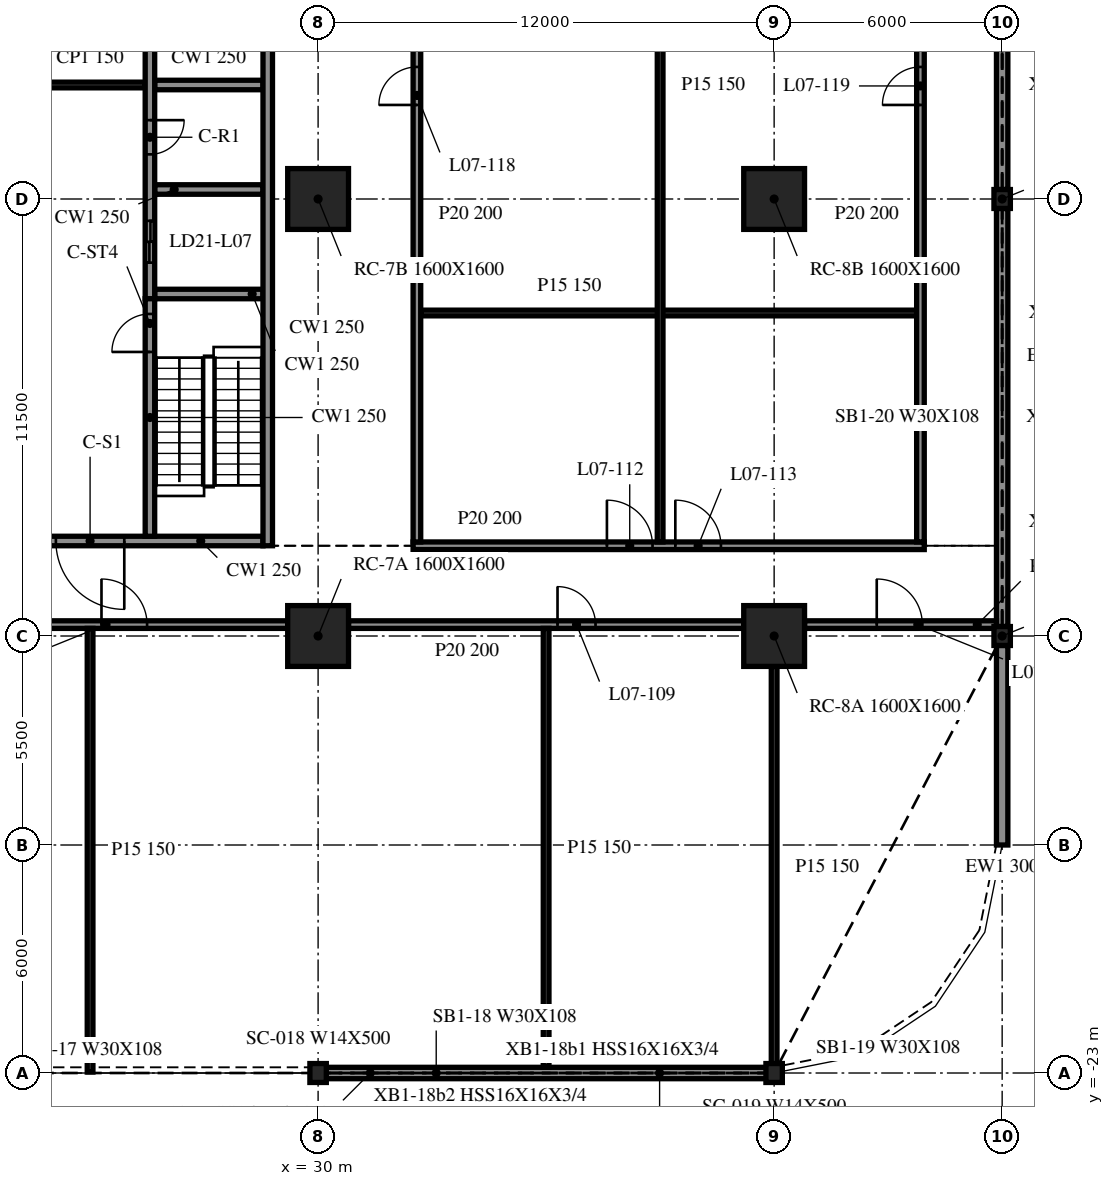
"""IFC4 building model, lengths in metres.
Left out: names, types, materials, properties, quantities, classifications, styles, units other than length and angle.
Written with IfcOpenShell. Run it as: python <this file> out.ifc"""

import sys

from ifc_helpers import new_model, si_unit, direction, frame, frame_2d, origin, origin_2d, place, context, subcontext, project, spatial, rectangle, i_section, extrude, element, fill, save


model = new_model("IFC4")
c1 = context("Model", 3, precision=1e-05, world=origin(), true_north=direction((0.0, 1.0)))
c2 = subcontext(c1, "Body", "Model", "MODEL_VIEW")
j1 = project(units=[si_unit("LENGTHUNIT", "METRE"), si_unit("PLANEANGLEUNIT", "RADIAN")], contexts=[c1])
p1 = place(None, origin())
s1 = spatial("IfcSite", under=j1, at=p1, CompositionType="ELEMENT")
p2 = place(p1, origin())
s2 = spatial("IfcBuilding", under=s1, at=p2, CompositionType="ELEMENT")
p3 = place(p2, frame((0.0, 0.0, 33.0)))
s3 = spatial("IfcBuildingStorey", under=s2, at=p3, CompositionType="ELEMENT", Elevation=33.0)
for number, where, z_axis, x_axis in (
    (1, (30.0, -11.5, -0.34), (0.0, 0.0, 1.0), (1.0, 0.0, 0.0)),
    (2, (30.0, 0.0, -0.34), (0.0, 0.0, 1.0), (1.0, 0.0, 0.0)),
    (3, (42.0, -11.5, -0.34), (0.0, 0.0, 1.0), (1.0, 0.0, 0.0)),
    (4, (42.0, 0.0, -0.34), (0.0, 0.0, 1.0), (1.0, 0.0, 0.0)),
):
    element("IfcColumn", number, at=place(p3, frame(where, z_axis=z_axis, x_axis=x_axis)), inside=s3, PredefinedType="COLUMN", context=c2, shape_type="SweptSolid", body=[
        extrude(rectangle(XDim=1.6, YDim=1.6, at=origin_2d()), origin(), (0.0, 0.0, 1.0), 4.3),
    ])
for number, where, z_axis, x_axis in (
    (5, (30.0, -23.0, -0.34), (0.0, 0.0, 1.0), (1.0, 0.0, 0.0)),
    (6, (42.0, -23.0, -0.34), (0.0, 0.0, 1.0), (1.0, 0.0, 0.0)),
    (7, (48.0, -11.5, -0.34), (0.0, 0.0, 1.0), (1.0, 0.0, 0.0)),
    (8, (48.0, 0.0, -0.34), (0.0, 0.0, 1.0), (1.0, 0.0, 0.0)),
):
    element("IfcColumn", number, at=place(p3, frame(where, z_axis=z_axis, x_axis=x_axis)), inside=s3, PredefinedType="COLUMN", context=c2, shape_type="SweptSolid", body=[
        extrude(i_section(OverallWidth=0.432, OverallDepth=0.498, WebThickness=0.056, FlangeThickness=0.089, at=origin_2d()), origin(), (0.0, 0.0, 1.0), 4.3),
    ])
p4 = place(p3, frame((30.028, -23.0, 0.0), z_axis=(0.0, 0.0, 1.0), x_axis=(1.0, 0.0, 0.0)))
e9 = element("IfcWall", 9, at=p4, inside=s3, PredefinedType="NOTDEFINED", context=c2, shape_type="SweptSolid", body=[
    extrude(rectangle(XDim=11.944, YDim=0.3, at=frame_2d((5.972, 0.0))), origin(), (0.0, 0.0, 1.0), 3.203),
])
p5 = place(p3, frame((48.0, -17.0, 0.0), z_axis=(0.0, 0.0, 1.0), x_axis=(0.0, 1.0, 0.0)))
e10 = element("IfcWall", 10, at=p5, inside=s3, PredefinedType="NOTDEFINED", context=c2, shape_type="SweptSolid", body=[
    extrude(rectangle(XDim=5.251, YDim=0.3, at=frame_2d((2.625, 0.0))), origin(), (0.0, 0.0, 1.0), 3.203),
])
for number, where, z_axis, x_axis in (
    (11, (48.0, -11.251, 0.0), (0.0, 0.0, 1.0), (0.0, 1.0, 0.0)),
    (12, (48.0, 0.249, 0.0), (0.0, 0.0, 1.0), (0.0, 1.0, 0.0)),
):
    element("IfcWall", number, at=place(p3, frame(where, z_axis=z_axis, x_axis=x_axis)), inside=s3, PredefinedType="NOTDEFINED", context=c2, shape_type="SweptSolid", body=[
        extrude(rectangle(XDim=11.002, YDim=0.3, at=frame_2d((5.501, 0.0))), origin(), (0.0, 0.0, 1.0), 3.203),
    ])
p6 = place(p3, frame((28.675, -9.125, 0.0), z_axis=(0.0, 0.0, 1.0), x_axis=(0.0, 1.0, 0.0)))
e13 = element("IfcWall", 13, at=p6, inside=s3, PredefinedType="SOLIDWALL", context=c2, shape_type="SweptSolid", body=[
    extrude(rectangle(XDim=24.25, YDim=0.25, at=frame_2d((12.125, 0.0))), origin(), (0.0, 0.0, 1.0), 3.96),
])
p7 = place(p6, frame((14.425, 0.0, 0.0)))
e14 = element("IfcOpeningElement", 14, at=p7, cuts=e13, PredefinedType="OPENING", context=c2, shape_type="SweptSolid", body=[
    extrude(rectangle(XDim=0.9, YDim=2.1, at=frame_2d((0.45, 1.05))), frame((0.0, 0.135, 0.0), z_axis=(0.0, -1.0, 0.0), x_axis=(1.0, 0.0, 0.0)), (0.0, 0.0, 1.0), 0.27),
])
p8 = place(p6, frame((18.925, 0.0, 0.0)))
e15 = element("IfcOpeningElement", 15, at=p8, cuts=e13, PredefinedType="OPENING", context=c2, shape_type="SweptSolid", body=[
    extrude(rectangle(XDim=0.9, YDim=2.1, at=frame_2d((0.45, 1.05))), frame((0.0, 0.135, 0.0), z_axis=(0.0, -1.0, 0.0), x_axis=(1.0, 0.0, 0.0)), (0.0, 0.0, 1.0), 0.27),
])
p9 = place(p6, frame((22.087, 0.0, 0.0)))
e16 = element("IfcOpeningElement", 16, at=p9, cuts=e13, PredefinedType="OPENING", context=c2, shape_type="SweptSolid", body=[
    extrude(rectangle(XDim=0.9, YDim=2.1, at=frame_2d((0.45, 1.05))), frame((0.0, 0.135, 0.0), z_axis=(0.0, -1.0, 0.0), x_axis=(1.0, 0.0, 0.0)), (0.0, 0.0, 1.0), 0.27),
])
p10 = place(p3, frame((28.55, -9.0, 0.0), z_axis=(0.0, 0.0, 1.0), x_axis=(-1.0, 0.0, 0.0)))
e17 = element("IfcWall", 17, at=p10, inside=s3, PredefinedType="SOLIDWALL", context=c2, shape_type="SweptSolid", body=[
    extrude(rectangle(XDim=9.1, YDim=0.25, at=frame_2d((4.55, 0.0))), origin(), (0.0, 0.0, 1.0), 3.96),
])
p11 = place(p10, frame((3.65, 0.0, 0.0)))
e18 = element("IfcOpeningElement", 18, at=p11, cuts=e17, PredefinedType="OPENING", context=c2, shape_type="SweptSolid", body=[
    extrude(rectangle(XDim=1.8, YDim=2.1, at=frame_2d((0.9, 1.05))), frame((0.0, 0.135, 0.0), z_axis=(0.0, -1.0, 0.0), x_axis=(1.0, 0.0, 0.0)), (0.0, 0.0, 1.0), 0.27),
])
p12 = place(p3, frame((25.575, -8.875, 0.0), z_axis=(0.0, 0.0, 1.0), x_axis=(0.0, 1.0, 0.0)))
e19 = element("IfcWall", 19, at=p12, inside=s3, PredefinedType="SOLIDWALL", context=c2, shape_type="SweptSolid", body=[
    extrude(rectangle(XDim=6.25, YDim=0.25, at=frame_2d((3.125, 0.0))), origin(), (0.0, 0.0, 1.0), 3.96),
])
p13 = place(p12, frame((4.85, 0.0, 0.0)))
e20 = element("IfcOpeningElement", 20, at=p13, cuts=e19, PredefinedType="OPENING", context=c2, shape_type="SweptSolid", body=[
    extrude(rectangle(XDim=1.0, YDim=2.1, at=frame_2d((0.5, 1.05))), frame((0.0, 0.135, 0.0), z_axis=(0.0, -1.0, 0.0), x_axis=(1.0, 0.0, 0.0)), (0.0, 0.0, 1.0), 0.27),
])
p14 = place(p3, frame((25.575, 14.875, 0.0), z_axis=(0.0, 0.0, 1.0), x_axis=(0.0, -1.0, 0.0)))
e21 = element("IfcWall", 21, at=p14, inside=s3, PredefinedType="SOLIDWALL", context=c2, shape_type="SweptSolid", body=[
    extrude(rectangle(XDim=17.5, YDim=0.25, at=frame_2d((8.75, 0.0))), origin(), (0.0, 0.0, 1.0), 3.96),
])
p15 = place(p14, frame((15.45, 0.0, 0.0)))
e22 = element("IfcOpeningElement", 22, at=p15, cuts=e21, PredefinedType="OPENING", context=c2, shape_type="SweptSolid", body=[
    extrude(rectangle(XDim=1.1, YDim=2.1, at=frame_2d((0.55, 1.05))), frame((0.0, 0.135, 0.0), z_axis=(0.0, -1.0, 0.0), x_axis=(1.0, 0.0, 0.0)), (0.0, 0.0, 1.0), 0.27),
])
p16 = place(p14, frame((12.8, 0.0, 0.0)))
e23 = element("IfcOpeningElement", 23, at=p16, cuts=e21, PredefinedType="OPENING", context=c2, shape_type="SweptSolid", body=[
    extrude(rectangle(XDim=0.9, YDim=2.1, at=frame_2d((0.45, 1.05))), frame((0.0, 0.135, 0.0), z_axis=(0.0, -1.0, 0.0), x_axis=(1.0, 0.0, 0.0)), (0.0, 0.0, 1.0), 0.27),
])
for number, where, z_axis, x_axis in (
    (24, (25.7, -2.5, 0.0), (0.0, 0.0, 1.0), (1.0, 0.0, 0.0)),
    (25, (25.7, 0.25, 0.0), (0.0, 0.0, 1.0), (1.0, 0.0, 0.0)),
    (26, (25.7, 3.0, 0.0), (0.0, 0.0, 1.0), (1.0, 0.0, 0.0)),
):
    element("IfcWall", number, at=place(p3, frame(where, z_axis=z_axis, x_axis=x_axis)), inside=s3, PredefinedType="SOLIDWALL", context=c2, shape_type="SweptSolid", body=[
        extrude(rectangle(XDim=2.85, YDim=0.25, at=frame_2d((1.425, 0.0))), origin(), (0.0, 0.0, 1.0), 3.96),
    ])
p17 = place(p3, frame((22.55, 3.0, 0.0), z_axis=(0.0, 0.0, 1.0), x_axis=(1.0, 0.0, 0.0)))
e27 = element("IfcWall", 27, at=p17, inside=s3, PredefinedType="PARTITIONING", context=c2, shape_type="SweptSolid", body=[
    extrude(rectangle(XDim=2.9, YDim=0.15, at=frame_2d((1.45, 0.0))), origin(), (0.0, 0.0, 1.0), 3.96),
])
p18 = place(p3, frame((18.8, -11.2, 0.0), z_axis=(0.0, 0.0, 1.0), x_axis=(1.0, 0.0, 0.0)))
e28 = element("IfcWall", 28, at=p18, inside=s3, PredefinedType="PARTITIONING", context=c2, shape_type="SweptSolid", body=[
    extrude(rectangle(XDim=10.4, YDim=0.2, at=frame_2d((5.2, 0.0))), origin(), (0.0, 0.0, 1.0), 3.96),
])
p19 = place(p18, frame((5.5, 0.0, 0.0)))
e29 = element("IfcOpeningElement", 29, at=p19, cuts=e28, PredefinedType="OPENING", context=c2, shape_type="SweptSolid", body=[
    extrude(rectangle(XDim=1.2, YDim=2.1, at=frame_2d((0.6, 1.05))), frame((0.0, 0.11, 0.0), z_axis=(0.0, -1.0, 0.0), x_axis=(1.0, 0.0, 0.0)), (0.0, 0.0, 1.0), 0.22),
])
p20 = place(p3, frame((30.8, -11.2, 0.0), z_axis=(0.0, 0.0, 1.0), x_axis=(1.0, 0.0, 0.0)))
e30 = element("IfcWall", 30, at=p20, inside=s3, PredefinedType="PARTITIONING", context=c2, shape_type="SweptSolid", body=[
    extrude(rectangle(XDim=10.4, YDim=0.2, at=frame_2d((5.2, 0.0))), origin(), (0.0, 0.0, 1.0), 3.96),
])
p21 = place(p20, frame((5.5, 0.0, 0.0)))
e31 = element("IfcOpeningElement", 31, at=p21, cuts=e30, PredefinedType="OPENING", context=c2, shape_type="SweptSolid", body=[
    extrude(rectangle(XDim=1.0, YDim=2.1, at=frame_2d((0.5, 1.05))), frame((0.0, 0.11, 0.0), z_axis=(0.0, -1.0, 0.0), x_axis=(1.0, 0.0, 0.0)), (0.0, 0.0, 1.0), 0.22),
])
p22 = place(p3, frame((42.8, -11.2, 0.0), z_axis=(0.0, 0.0, 1.0), x_axis=(1.0, 0.0, 0.0)))
e32 = element("IfcWall", 32, at=p22, inside=s3, PredefinedType="PARTITIONING", context=c2, shape_type="SweptSolid", body=[
    extrude(rectangle(XDim=5.05, YDim=0.2, at=frame_2d((2.525, 0.0))), origin(), (0.0, 0.0, 1.0), 3.96),
])
p23 = place(p22, frame((1.9, 0.0, 0.0)))
e33 = element("IfcOpeningElement", 33, at=p23, cuts=e32, PredefinedType="OPENING", context=c2, shape_type="SweptSolid", body=[
    extrude(rectangle(XDim=1.2, YDim=2.1, at=frame_2d((0.6, 1.05))), frame((0.0, 0.11, 0.0), z_axis=(0.0, -1.0, 0.0), x_axis=(1.0, 0.0, 0.0)), (0.0, 0.0, 1.0), 0.22),
])
p24 = place(p3, frame((32.5, -9.125, 0.0), z_axis=(0.0, 0.0, 1.0), x_axis=(1.0, 0.0, 0.0)))
e34 = element("IfcWall", 34, at=p24, inside=s3, PredefinedType="PARTITIONING", context=c2, shape_type="SweptSolid", body=[
    extrude(rectangle(XDim=13.45, YDim=0.2, at=frame_2d((6.725, 0.0))), origin(), (0.0, 0.0, 1.0), 3.96),
])
p25 = place(p24, frame((5.1, 0.0, 0.0)))
e35 = element("IfcOpeningElement", 35, at=p25, cuts=e34, PredefinedType="OPENING", context=c2, shape_type="SweptSolid", body=[
    extrude(rectangle(XDim=1.2, YDim=2.1, at=frame_2d((0.6, 1.05))), frame((0.0, 0.11, 0.0), z_axis=(0.0, -1.0, 0.0), x_axis=(1.0, 0.0, 0.0)), (0.0, 0.0, 1.0), 0.22),
])
p26 = place(p24, frame((6.9, 0.0, 0.0)))
e36 = element("IfcOpeningElement", 36, at=p26, cuts=e34, PredefinedType="OPENING", context=c2, shape_type="SweptSolid", body=[
    extrude(rectangle(XDim=1.2, YDim=2.1, at=frame_2d((0.6, 1.05))), frame((0.0, 0.11, 0.0), z_axis=(0.0, -1.0, 0.0), x_axis=(1.0, 0.0, 0.0)), (0.0, 0.0, 1.0), 0.22),
])
p27 = place(p3, frame((32.7, -3.0, 0.0), z_axis=(0.0, 0.0, 1.0), x_axis=(1.0, 0.0, 0.0)))
e37 = element("IfcWall", 37, at=p27, inside=s3, PredefinedType="PARTITIONING", context=c2, shape_type="SweptSolid", body=[
    extrude(rectangle(XDim=13.05, YDim=0.15, at=frame_2d((6.525, 0.0))), origin(), (0.0, 0.0, 1.0), 3.96),
])
p28 = place(p3, frame((24.0, -22.975, 0.0), z_axis=(0.0, 0.0, 1.0), x_axis=(0.0, 1.0, 0.0)))
e38 = element("IfcWall", 38, at=p28, inside=s3, PredefinedType="PARTITIONING", context=c2, shape_type="SweptSolid", body=[
    extrude(rectangle(XDim=11.675, YDim=0.15, at=frame_2d((5.837, 0.0))), origin(), (0.0, 0.0, 1.0), 3.96),
])
p29 = place(p3, frame((32.6, -9.025, 0.0), z_axis=(0.0, 0.0, 1.0), x_axis=(0.0, 1.0, 0.0)))
e39 = element("IfcWall", 39, at=p29, inside=s3, PredefinedType="PARTITIONING", context=c2, shape_type="SweptSolid", body=[
    extrude(rectangle(XDim=24.05, YDim=0.2, at=frame_2d((12.025, 0.0))), origin(), (0.0, 0.0, 1.0), 3.96),
])
p30 = place(p29, frame((11.5, 0.0, 0.0)))
e40 = element("IfcOpeningElement", 40, at=p30, cuts=e39, PredefinedType="OPENING", context=c2, shape_type="SweptSolid", body=[
    extrude(rectangle(XDim=1.0, YDim=2.1, at=frame_2d((0.5, 1.05))), frame((0.0, 0.11, 0.0), z_axis=(0.0, -1.0, 0.0), x_axis=(1.0, 0.0, 0.0)), (0.0, 0.0, 1.0), 0.22),
])
p31 = place(p3, frame((36.0, -22.85, 0.0), z_axis=(0.0, 0.0, 1.0), x_axis=(0.0, 1.0, 0.0)))
e41 = element("IfcWall", 41, at=p31, inside=s3, PredefinedType="PARTITIONING", context=c2, shape_type="SweptSolid", body=[
    extrude(rectangle(XDim=11.55, YDim=0.15, at=frame_2d((5.775, 0.0))), origin(), (0.0, 0.0, 1.0), 3.96),
])
p32 = place(p3, frame((39.0, -9.025, 0.0), z_axis=(0.0, 0.0, 1.0), x_axis=(0.0, 1.0, 0.0)))
e42 = element("IfcWall", 42, at=p32, inside=s3, PredefinedType="PARTITIONING", context=c2, shape_type="SweptSolid", body=[
    extrude(rectangle(XDim=24.05, YDim=0.15, at=frame_2d((12.025, 0.0))), origin(), (0.0, 0.0, 1.0), 3.96),
])
p33 = place(p3, frame((42.0, -22.847, 0.0), z_axis=(0.0, 0.0, 1.0), x_axis=(0.0, 1.0, 0.0)))
e43 = element("IfcWall", 43, at=p33, inside=s3, PredefinedType="PARTITIONING", context=c2, shape_type="SweptSolid", body=[
    extrude(rectangle(XDim=10.547, YDim=0.15, at=frame_2d((5.273, 0.0))), origin(), (0.0, 0.0, 1.0), 3.96),
])
p34 = place(p3, frame((45.85, -9.025, 0.0), z_axis=(0.0, 0.0, 1.0), x_axis=(0.0, 1.0, 0.0)))
e44 = element("IfcWall", 44, at=p34, inside=s3, PredefinedType="PARTITIONING", context=c2, shape_type="SweptSolid", body=[
    extrude(rectangle(XDim=24.05, YDim=0.2, at=frame_2d((12.025, 0.0))), origin(), (0.0, 0.0, 1.0), 3.96),
])
p35 = place(p34, frame((11.5, 0.0, 0.0)))
e45 = element("IfcOpeningElement", 45, at=p35, cuts=e44, PredefinedType="OPENING", context=c2, shape_type="SweptSolid", body=[
    extrude(rectangle(XDim=1.0, YDim=2.1, at=frame_2d((0.5, 1.05))), frame((0.0, 0.11, 0.0), z_axis=(0.0, -1.0, 0.0), x_axis=(1.0, 0.0, 0.0)), (0.0, 0.0, 1.0), 0.22),
])
p36 = place(p11, origin())
e46 = element("IfcDoor", 46, at=p36, inside=s3, OperationType="DOUBLE_DOOR_SINGLE_SWING", PredefinedType="DOOR", context=c2, shape_type="SweptSolid", body=[
    extrude(rectangle(XDim=1.8, YDim=2.1, at=frame_2d((0.9, 1.05))), frame((0.0, 0.025, 0.0), z_axis=(0.0, -1.0, 0.0), x_axis=(1.0, 0.0, 0.0)), (0.0, 0.0, 1.0), 0.05),
])
fill(e18, e46)
p37 = place(p15, origin())
e47 = element("IfcDoor", 47, at=p37, inside=s3, OperationType="DOUBLE_DOOR_SLIDING", PredefinedType="DOOR", context=c2, shape_type="SweptSolid", body=[
    extrude(rectangle(XDim=1.1, YDim=2.1, at=frame_2d((0.55, 1.05))), frame((0.0, 0.025, 0.0), z_axis=(0.0, -1.0, 0.0), x_axis=(1.0, 0.0, 0.0)), (0.0, 0.0, 1.0), 0.05),
])
fill(e22, e47)
p38 = place(p16, origin())
e48 = element("IfcDoor", 48, at=p38, inside=s3, OperationType="SINGLE_SWING_LEFT", PredefinedType="DOOR", context=c2, shape_type="SweptSolid", body=[
    extrude(rectangle(XDim=0.9, YDim=2.1, at=frame_2d((0.45, 1.05))), frame((0.0, 0.025, 0.0), z_axis=(0.0, -1.0, 0.0), x_axis=(1.0, 0.0, 0.0)), (0.0, 0.0, 1.0), 0.05),
])
fill(e23, e48)
p39 = place(p13, origin())
e49 = element("IfcDoor", 49, at=p39, inside=s3, OperationType="SINGLE_SWING_RIGHT", PredefinedType="DOOR", context=c2, shape_type="SweptSolid", body=[
    extrude(rectangle(XDim=1.0, YDim=2.1, at=frame_2d((0.5, 1.05))), frame((0.0, 0.025, 0.0), z_axis=(0.0, -1.0, 0.0), x_axis=(1.0, 0.0, 0.0)), (0.0, 0.0, 1.0), 0.05),
])
fill(e20, e49)
p40 = place(p19, origin())
e50 = element("IfcDoor", 50, at=p40, inside=s3, OperationType="SINGLE_SWING_LEFT", PredefinedType="DOOR", context=c2, shape_type="SweptSolid", body=[
    extrude(rectangle(XDim=1.2, YDim=2.1, at=frame_2d((0.6, 1.05))), frame((0.0, 0.025, 0.0), z_axis=(0.0, -1.0, 0.0), x_axis=(1.0, 0.0, 0.0)), (0.0, 0.0, 1.0), 0.05),
])
fill(e29, e50)
p41 = place(p21, origin())
e51 = element("IfcDoor", 51, at=p41, inside=s3, OperationType="SINGLE_SWING_LEFT", PredefinedType="DOOR", context=c2, shape_type="SweptSolid", body=[
    extrude(rectangle(XDim=1.0, YDim=2.1, at=frame_2d((0.5, 1.05))), frame((0.0, 0.025, 0.0), z_axis=(0.0, -1.0, 0.0), x_axis=(1.0, 0.0, 0.0)), (0.0, 0.0, 1.0), 0.05),
])
fill(e31, e51)
p42 = place(p23, origin())
e52 = element("IfcDoor", 52, at=p42, inside=s3, OperationType="SINGLE_SWING_RIGHT", PredefinedType="DOOR", context=c2, shape_type="SweptSolid", body=[
    extrude(rectangle(XDim=1.2, YDim=2.1, at=frame_2d((0.6, 1.05))), frame((0.0, 0.025, 0.0), z_axis=(0.0, -1.0, 0.0), x_axis=(1.0, 0.0, 0.0)), (0.0, 0.0, 1.0), 0.05),
])
fill(e33, e52)
p43 = place(p25, origin())
e53 = element("IfcDoor", 53, at=p43, inside=s3, OperationType="SINGLE_SWING_LEFT", PredefinedType="DOOR", context=c2, shape_type="SweptSolid", body=[
    extrude(rectangle(XDim=1.2, YDim=2.1, at=frame_2d((0.6, 1.05))), frame((0.0, 0.025, 0.0), z_axis=(0.0, -1.0, 0.0), x_axis=(1.0, 0.0, 0.0)), (0.0, 0.0, 1.0), 0.05),
])
fill(e35, e53)
p44 = place(p26, origin())
e54 = element("IfcDoor", 54, at=p44, inside=s3, OperationType="SINGLE_SWING_RIGHT", PredefinedType="DOOR", context=c2, shape_type="SweptSolid", body=[
    extrude(rectangle(XDim=1.2, YDim=2.1, at=frame_2d((0.6, 1.05))), frame((0.0, 0.025, 0.0), z_axis=(0.0, -1.0, 0.0), x_axis=(1.0, 0.0, 0.0)), (0.0, 0.0, 1.0), 0.05),
])
fill(e36, e54)
p45 = place(p30, origin())
e55 = element("IfcDoor", 55, at=p45, inside=s3, OperationType="SINGLE_SWING_RIGHT", PredefinedType="DOOR", context=c2, shape_type="SweptSolid", body=[
    extrude(rectangle(XDim=1.0, YDim=2.1, at=frame_2d((0.5, 1.05))), frame((0.0, 0.025, 0.0), z_axis=(0.0, -1.0, 0.0), x_axis=(1.0, 0.0, 0.0)), (0.0, 0.0, 1.0), 0.05),
])
fill(e40, e55)
p46 = place(p35, origin())
e56 = element("IfcDoor", 56, at=p46, inside=s3, OperationType="SINGLE_SWING_LEFT", PredefinedType="DOOR", context=c2, shape_type="SweptSolid", body=[
    extrude(rectangle(XDim=1.0, YDim=2.1, at=frame_2d((0.5, 1.05))), frame((0.0, 0.025, 0.0), z_axis=(0.0, -1.0, 0.0), x_axis=(1.0, 0.0, 0.0)), (0.0, 0.0, 1.0), 0.05),
])
fill(e45, e56)
save(model, sys.argv[1])
